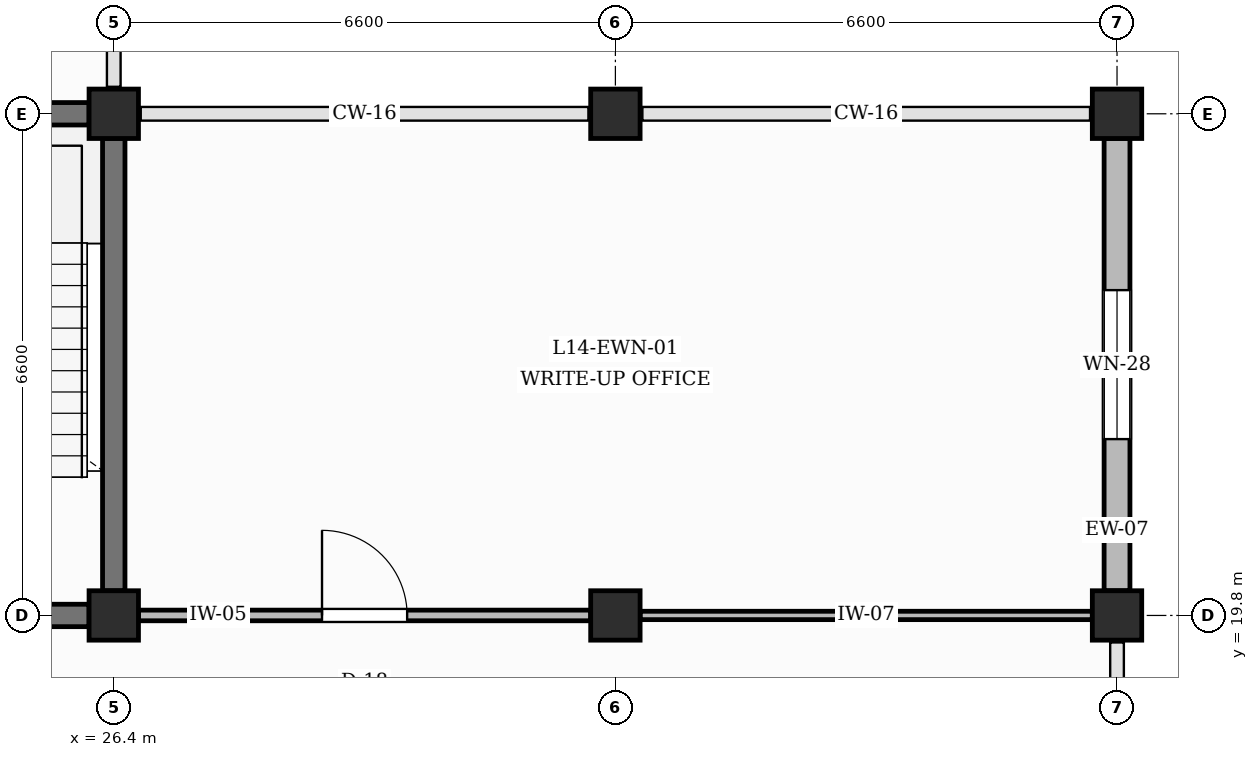
"""IFC4 building model, lengths in metres.
Left out: names, types, materials, properties, quantities, classifications, styles, units other than length and angle.
Written with IfcOpenShell. Run it as: python <this file> out.ifc"""

import sys

from ifc_helpers import new_model, si_unit, direction, frame, frame_2d, origin, origin_2d, place, context, subcontext, project, spatial, rectangle, extrude, element, fill, save


model = new_model("IFC4")
c1 = context("Model", 3, precision=1e-05, world=origin(), true_north=direction((0.0, 1.0)))
c2 = subcontext(c1, "Body", "Model", "MODEL_VIEW")
j1 = project(units=[si_unit("LENGTHUNIT", "METRE"), si_unit("PLANEANGLEUNIT", "RADIAN")], contexts=[c1])
p1 = place(None, origin())
s1 = spatial("IfcSite", under=j1, at=p1, CompositionType="ELEMENT")
p2 = place(p1, origin())
s2 = spatial("IfcBuilding", under=s1, at=p2, CompositionType="ELEMENT")
p3 = place(p2, frame((0.0, 0.0, 60.6)))
s3 = spatial("IfcBuildingStorey", under=s2, at=p3, CompositionType="ELEMENT", Elevation=60.6)
for number, where, z_axis, x_axis in (
    (1, (26.4, 19.8, 0.0), (0.0, 0.0, 1.0), (1.0, 0.0, 0.0)),
    (2, (26.4, 26.4, 0.0), (0.0, 0.0, 1.0), (1.0, 0.0, 0.0)),
    (3, (33.0, 19.8, 0.0), (0.0, 0.0, 1.0), (1.0, 0.0, 0.0)),
    (4, (33.0, 26.4, 0.0), (0.0, 0.0, 1.0), (1.0, 0.0, 0.0)),
    (5, (39.6, 19.8, 0.0), (0.0, 0.0, 1.0), (1.0, 0.0, 0.0)),
    (6, (39.6, 26.4, 0.0), (0.0, 0.0, 1.0), (1.0, 0.0, 0.0)),
):
    element("IfcColumn", number, at=place(p3, frame(where, z_axis=z_axis, x_axis=x_axis)), inside=s3, PredefinedType="COLUMN", context=c2, shape_type="SweptSolid", body=[
        extrude(rectangle(XDim=0.65, YDim=0.65, at=origin_2d()), origin(), (0.0, 0.0, 1.0), 4.2),
    ])
p4 = place(p3, frame((39.6, 20.125, 0.0), z_axis=(0.0, 0.0, 1.0), x_axis=(0.0, 1.0, 0.0)))
e7 = element("IfcWall", 7, at=p4, inside=s3, PredefinedType="SOLIDWALL", context=c2, shape_type="SweptSolid", body=[
    extrude(rectangle(XDim=5.95, YDim=0.34, at=frame_2d((2.975, 0.0))), origin(), (0.0, 0.0, 1.0), 3.31),
])
p5 = place(p4, frame((1.995, 0.0, 0.95)))
e8 = element("IfcOpeningElement", 8, at=p5, cuts=e7, PredefinedType="OPENING", context=c2, shape_type="SweptSolid", body=[
    extrude(rectangle(XDim=1.96, YDim=1.96, at=frame_2d((0.98, 0.98))), frame((0.0, 0.18, 0.0), z_axis=(0.0, -1.0, 0.0), x_axis=(1.0, 0.0, 0.0)), (0.0, 0.0, 1.0), 0.36),
])
p6 = place(p3, frame((20.125, 19.8, 0.0), z_axis=(0.0, 0.0, 1.0), x_axis=(1.0, 0.0, 0.0)))
e9 = element("IfcWall", 9, at=p6, inside=s3, PredefinedType="SHEAR", context=c2, shape_type="SweptSolid", body=[
    extrude(rectangle(XDim=5.95, YDim=0.295, at=frame_2d((2.975, 0.0))), origin(), (0.0, 0.0, 1.0), 3.31),
])
p7 = place(p6, frame((2.4, 0.0, 0.0)))
e10 = element("IfcOpeningElement", 10, at=p7, cuts=e9, PredefinedType="OPENING", context=c2, shape_type="SweptSolid", body=[
    extrude(rectangle(XDim=1.15, YDim=2.2, at=frame_2d((0.575, 1.1))), frame((0.0, 0.157, 0.0), z_axis=(0.0, -1.0, 0.0), x_axis=(1.0, 0.0, 0.0)), (0.0, 0.0, 1.0), 0.315),
])
for number, where, z_axis, x_axis in (
    (11, (20.125, 26.4, 0.0), (0.0, 0.0, 1.0), (1.0, 0.0, 0.0)),
    (12, (26.4, 20.125, 0.0), (0.0, 0.0, 1.0), (0.0, 1.0, 0.0)),
):
    element("IfcWall", number, at=place(p3, frame(where, z_axis=z_axis, x_axis=x_axis)), inside=s3, PredefinedType="SHEAR", context=c2, shape_type="SweptSolid", body=[
        extrude(rectangle(XDim=5.95, YDim=0.295, at=frame_2d((2.975, 0.0))), origin(), (0.0, 0.0, 1.0), 3.31),
    ])
p8 = place(p3, frame((26.725, 19.8, 0.0), z_axis=(0.0, 0.0, 1.0), x_axis=(1.0, 0.0, 0.0)))
e13 = element("IfcWall", 13, at=p8, inside=s3, PredefinedType="PARTITIONING", context=c2, shape_type="SweptSolid", body=[
    extrude(rectangle(XDim=5.95, YDim=0.14, at=frame_2d((2.975, 0.0))), origin(), (0.0, 0.0, 1.0), 3.31),
])
p9 = place(p8, frame((2.415, 0.0, 0.0)))
e14 = element("IfcOpeningElement", 14, at=p9, cuts=e13, PredefinedType="OPENING", context=c2, shape_type="SweptSolid", body=[
    extrude(rectangle(XDim=1.12, YDim=2.2, at=frame_2d((0.56, 1.1))), frame((0.0, 0.08, 0.0), z_axis=(0.0, -1.0, 0.0), x_axis=(1.0, 0.0, 0.0)), (0.0, 0.0, 1.0), 0.16),
])
p10 = place(p3, frame((33.325, 19.8, 0.0), z_axis=(0.0, 0.0, 1.0), x_axis=(1.0, 0.0, 0.0)))
e15 = element("IfcWall", 15, at=p10, inside=s3, PredefinedType="PARTITIONING", context=c2, shape_type="SweptSolid", body=[
    extrude(rectangle(XDim=5.95, YDim=0.11, at=frame_2d((2.975, 0.0))), origin(), (0.0, 0.0, 1.0), 3.31),
])
p11 = place(p5, origin())
e16 = element("IfcWindow", 16, at=p11, inside=s3, PartitioningType="DOUBLE_PANEL_VERTICAL", PredefinedType="WINDOW", context=c2, shape_type="SweptSolid", body=[
    extrude(rectangle(XDim=1.96, YDim=1.96, at=frame_2d((0.98, 0.98))), frame((0.0, 0.03, 0.0), z_axis=(0.0, -1.0, 0.0), x_axis=(1.0, 0.0, 0.0)), (0.0, 0.0, 1.0), 0.06),
])
fill(e8, e16)
p12 = place(p9, origin())
e17 = element("IfcDoor", 17, at=p12, inside=s3, OperationType="SINGLE_SWING_LEFT", PredefinedType="DOOR", context=c2, shape_type="SweptSolid", body=[
    extrude(rectangle(XDim=1.12, YDim=2.2, at=frame_2d((0.56, 1.1))), frame((0.0, 0.025, 0.0), z_axis=(0.0, -1.0, 0.0), x_axis=(1.0, 0.0, 0.0)), (0.0, 0.0, 1.0), 0.05),
])
fill(e14, e17)
save(model, sys.argv[1])
